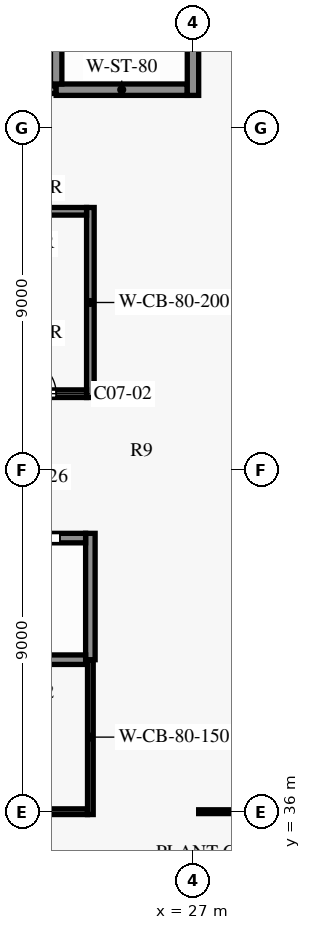
"""IFC4 building model, lengths in metres.
Left out: names, types, materials, properties, quantities, classifications, styles, units other than length and angle.
Written with IfcOpenShell. Run it as: python <this file> out.ifc"""

import sys

from ifc_helpers import new_model, si_unit, direction, frame, frame_2d, origin, place, context, subcontext, project, spatial, rectangle, extrude, element, fill, save


model = new_model("IFC4")
c1 = context("Model", 3, precision=1e-05, world=origin(), true_north=direction((0.0, 1.0)))
c2 = subcontext(c1, "Body", "Model", "MODEL_VIEW")
j1 = project(units=[si_unit("LENGTHUNIT", "METRE"), si_unit("PLANEANGLEUNIT", "RADIAN")], contexts=[c1])
p1 = place(None, origin())
s1 = spatial("IfcSite", under=j1, at=p1, CompositionType="ELEMENT")
p2 = place(p1, origin())
s2 = spatial("IfcBuilding", under=s1, at=p2, CompositionType="ELEMENT")
p3 = place(p2, frame((0.0, 0.0, 32.0)))
s3 = spatial("IfcBuildingStorey", under=s2, at=p3, CompositionType="ELEMENT", Elevation=32.0)
p4 = place(p3, frame((12.4, 36.0, 0.0), z_axis=(0.0, 0.0, 1.0), x_axis=(1.0, 0.0, 0.0)))
e1 = element("IfcWall", 1, at=p4, inside=s3, PredefinedType="SHEAR", context=c2, shape_type="SweptSolid", body=[
    extrude(rectangle(XDim=11.825, YDim=0.15, at=frame_2d((5.913, 0.0))), origin(), (0.0, 0.0, 1.0), 5.2),
])
p5 = place(p4, frame((0.95, 0.0, 0.0)))
e2 = element("IfcOpeningElement", 2, at=p5, cuts=e1, PredefinedType="OPENING", context=c2, shape_type="SweptSolid", body=[
    extrude(rectangle(XDim=0.9, YDim=2.1, at=frame_2d((0.45, 1.05))), frame((0.0, 0.085, 0.0), z_axis=(0.0, -1.0, 0.0), x_axis=(1.0, 0.0, 0.0)), (0.0, 0.0, 1.0), 0.17),
])
p6 = place(p4, frame((3.75, 0.0, 0.0)))
e3 = element("IfcOpeningElement", 3, at=p6, cuts=e1, PredefinedType="OPENING", context=c2, shape_type="SweptSolid", body=[
    extrude(rectangle(XDim=0.9, YDim=2.1, at=frame_2d((0.45, 1.05))), frame((0.0, 0.085, 0.0), z_axis=(0.0, -1.0, 0.0), x_axis=(1.0, 0.0, 0.0)), (0.0, 0.0, 1.0), 0.17),
])
p7 = place(p4, frame((6.325, 0.0, 0.0)))
e4 = element("IfcOpeningElement", 4, at=p7, cuts=e1, PredefinedType="OPENING", context=c2, shape_type="SweptSolid", body=[
    extrude(rectangle(XDim=0.95, YDim=2.1, at=frame_2d((0.475, 1.05))), frame((0.0, 0.085, 0.0), z_axis=(0.0, -1.0, 0.0), x_axis=(1.0, 0.0, 0.0)), (0.0, 0.0, 1.0), 0.17),
])
p8 = place(p4, frame((9.5, 0.0, 0.0)))
e5 = element("IfcOpeningElement", 5, at=p8, cuts=e1, PredefinedType="OPENING", context=c2, shape_type="SweptSolid", body=[
    extrude(rectangle(XDim=0.9, YDim=2.1, at=frame_2d((0.45, 1.05))), frame((0.0, 0.085, 0.0), z_axis=(0.0, -1.0, 0.0), x_axis=(1.0, 0.0, 0.0)), (0.0, 0.0, 1.0), 0.17),
])
p9 = place(p3, frame((8.1, 40.0, 0.0), z_axis=(0.0, 0.0, 1.0), x_axis=(1.0, 0.0, 0.0)))
e6 = element("IfcWall", 6, at=p9, inside=s3, PredefinedType="SHEAR", context=c2, shape_type="SweptSolid", body=[
    extrude(rectangle(XDim=16.075, YDim=0.25, at=frame_2d((8.038, 0.0))), origin(), (0.0, 0.0, 1.0), 5.2),
])
p10 = place(p3, frame((8.1, 43.2, 0.0), z_axis=(0.0, 0.0, 1.0), x_axis=(1.0, 0.0, 0.0)))
e7 = element("IfcWall", 7, at=p10, inside=s3, PredefinedType="SHEAR", context=c2, shape_type="SweptSolid", body=[
    extrude(rectangle(XDim=16.075, YDim=0.25, at=frame_2d((8.038, 0.0))), origin(), (0.0, 0.0, 1.0), 5.2),
])
p11 = place(p10, frame((14.3, 0.0, 0.0)))
e8 = element("IfcOpeningElement", 8, at=p11, cuts=e7, PredefinedType="OPENING", context=c2, shape_type="SweptSolid", body=[
    extrude(rectangle(XDim=1.1, YDim=2.1, at=frame_2d((0.55, 1.05))), frame((0.0, 0.135, 0.0), z_axis=(0.0, -1.0, 0.0), x_axis=(1.0, 0.0, 0.0)), (0.0, 0.0, 1.0), 0.27),
])
p12 = place(p10, frame((0.8, 0.0, 0.0)))
e9 = element("IfcOpeningElement", 9, at=p12, cuts=e7, PredefinedType="OPENING", context=c2, shape_type="SweptSolid", body=[
    extrude(rectangle(XDim=1.1, YDim=2.1, at=frame_2d((0.55, 1.05))), frame((0.0, 0.135, 0.0), z_axis=(0.0, -1.0, 0.0), x_axis=(1.0, 0.0, 0.0)), (0.0, 0.0, 1.0), 0.27),
])
p13 = place(p10, frame((3.5, 0.0, 0.0)))
e10 = element("IfcOpeningElement", 10, at=p13, cuts=e7, PredefinedType="OPENING", context=c2, shape_type="SweptSolid", body=[
    extrude(rectangle(XDim=1.1, YDim=2.1, at=frame_2d((0.55, 1.05))), frame((0.0, 0.135, 0.0), z_axis=(0.0, -1.0, 0.0), x_axis=(1.0, 0.0, 0.0)), (0.0, 0.0, 1.0), 0.27),
])
p14 = place(p10, frame((6.2, 0.0, 0.0)))
e11 = element("IfcOpeningElement", 11, at=p14, cuts=e7, PredefinedType="OPENING", context=c2, shape_type="SweptSolid", body=[
    extrude(rectangle(XDim=1.1, YDim=2.1, at=frame_2d((0.55, 1.05))), frame((0.0, 0.135, 0.0), z_axis=(0.0, -1.0, 0.0), x_axis=(1.0, 0.0, 0.0)), (0.0, 0.0, 1.0), 0.27),
])
p15 = place(p10, frame((8.9, 0.0, 0.0)))
e12 = element("IfcOpeningElement", 12, at=p15, cuts=e7, PredefinedType="OPENING", context=c2, shape_type="SweptSolid", body=[
    extrude(rectangle(XDim=1.1, YDim=2.1, at=frame_2d((0.55, 1.05))), frame((0.0, 0.135, 0.0), z_axis=(0.0, -1.0, 0.0), x_axis=(1.0, 0.0, 0.0)), (0.0, 0.0, 1.0), 0.27),
])
p16 = place(p10, frame((11.6, 0.0, 0.0)))
e13 = element("IfcOpeningElement", 13, at=p16, cuts=e7, PredefinedType="OPENING", context=c2, shape_type="SweptSolid", body=[
    extrude(rectangle(XDim=1.1, YDim=2.1, at=frame_2d((0.55, 1.05))), frame((0.0, 0.135, 0.0), z_axis=(0.0, -1.0, 0.0), x_axis=(1.0, 0.0, 0.0)), (0.0, 0.0, 1.0), 0.27),
])
p17 = place(p3, frame((21.6, 47.0, 0.0), z_axis=(0.0, 0.0, 1.0), x_axis=(1.0, 0.0, 0.0)))
e14 = element("IfcWall", 14, at=p17, inside=s3, PredefinedType="PARTITIONING", context=c2, shape_type="SweptSolid", body=[
    extrude(rectangle(XDim=2.6, YDim=0.2, at=frame_2d((1.3, 0.0))), origin(), (0.0, 0.0, 1.0), 5.2),
])
p18 = place(p17, frame((0.9, 0.0, 0.0)))
e15 = element("IfcOpeningElement", 15, at=p18, cuts=e14, PredefinedType="OPENING", context=c2, shape_type="SweptSolid", body=[
    extrude(rectangle(XDim=0.9, YDim=2.1, at=frame_2d((0.45, 1.05))), frame((0.0, 0.11, 0.0), z_axis=(0.0, -1.0, 0.0), x_axis=(1.0, 0.0, 0.0)), (0.0, 0.0, 1.0), 0.22),
])
p19 = place(p3, frame((21.6, 51.8, 0.0), z_axis=(0.0, 0.0, 1.0), x_axis=(1.0, 0.0, 0.0)))
e16 = element("IfcWall", 16, at=p19, inside=s3, PredefinedType="PARTITIONING", context=c2, shape_type="SweptSolid", body=[
    extrude(rectangle(XDim=2.6, YDim=0.2, at=frame_2d((1.3, 0.0))), origin(), (0.0, 0.0, 1.0), 5.2),
])
p20 = place(p3, frame((16.15, 55.0, 0.0), z_axis=(0.0, 0.0, 1.0), x_axis=(1.0, 0.0, 0.0)))
e17 = element("IfcWall", 17, at=p20, inside=s3, PredefinedType="PARTITIONING", context=c2, shape_type="SweptSolid", body=[
    extrude(rectangle(XDim=7.25, YDim=0.2, at=frame_2d((3.625, 0.0))), origin(), (0.0, 0.0, 1.0), 5.2),
])
p21 = place(p20, frame((3.125, 0.0, 0.0)))
e18 = element("IfcOpeningElement", 18, at=p21, cuts=e17, PredefinedType="OPENING", context=c2, shape_type="SweptSolid", body=[
    extrude(rectangle(XDim=1.0, YDim=2.1, at=frame_2d((0.5, 1.05))), frame((0.0, 0.11, 0.0), z_axis=(0.0, -1.0, 0.0), x_axis=(1.0, 0.0, 0.0)), (0.0, 0.0, 1.0), 0.22),
])
p22 = place(p3, frame((23.4, 55.0, 0.0), z_axis=(0.0, 0.0, 1.0), x_axis=(1.0, 0.0, 0.0)))
e19 = element("IfcWall", 19, at=p22, inside=s3, PredefinedType="SHEAR", context=c2, shape_type="SweptSolid", body=[
    extrude(rectangle(XDim=3.45, YDim=0.3, at=frame_2d((1.725, 0.0))), origin(), (0.0, 0.0, 1.0), 5.2),
])
p23 = place(p3, frame((23.4, 55.15, 0.0), z_axis=(0.0, 0.0, 1.0), x_axis=(0.0, 1.0, 0.0)))
e20 = element("IfcWall", 20, at=p23, inside=s3, PredefinedType="SHEAR", context=c2, shape_type="SweptSolid", body=[
    extrude(rectangle(XDim=8.0, YDim=0.3, at=frame_2d((4.0, 0.0))), origin(), (0.0, 0.0, 1.0), 5.2),
])
p24 = place(p3, frame((24.3, 35.925, 0.0), z_axis=(0.0, 0.0, 1.0), x_axis=(0.0, 1.0, 0.0)))
e21 = element("IfcWall", 21, at=p24, inside=s3, PredefinedType="SHEAR", context=c2, shape_type="SweptSolid", body=[
    extrude(rectangle(XDim=4.075, YDim=0.15, at=frame_2d((2.038, 0.0))), origin(), (0.0, 0.0, 1.0), 5.2),
])
p25 = place(p3, frame((24.3, 46.9, 0.0), z_axis=(0.0, 0.0, 1.0), x_axis=(0.0, 1.0, 0.0)))
e22 = element("IfcWall", 22, at=p25, inside=s3, PredefinedType="SHEAR", context=c2, shape_type="SweptSolid", body=[
    extrude(rectangle(XDim=5.0, YDim=0.2, at=frame_2d((2.5, 0.0))), origin(), (0.0, 0.0, 1.0), 5.2),
])
p26 = place(p3, frame((24.3, 40.0, 0.0), z_axis=(0.0, 0.0, 1.0), x_axis=(0.0, 1.0, 0.0)))
e23 = element("IfcWall", 23, at=p26, inside=s3, PredefinedType="SHEAR", context=c2, shape_type="SweptSolid", body=[
    extrude(rectangle(XDim=3.325, YDim=0.25, at=frame_2d((1.663, 0.0))), origin(), (0.0, 0.0, 1.0), 5.2),
])
p27 = place(p3, frame((27.0, 54.85, 0.0), z_axis=(0.0, 0.0, 1.0), x_axis=(0.0, 1.0, 0.0)))
e24 = element("IfcWall", 24, at=p27, inside=s3, PredefinedType="SHEAR", context=c2, shape_type="SweptSolid", body=[
    extrude(rectangle(XDim=8.75, YDim=0.3, at=frame_2d((4.375, 0.0))), origin(), (0.0, 0.0, 1.0), 5.2),
])
p28 = place(p27, frame((6.55, 0.0, 0.0)))
e25 = element("IfcOpeningElement", 25, at=p28, cuts=e24, PredefinedType="OPENING", context=c2, shape_type="SweptSolid", body=[
    extrude(rectangle(XDim=1.2, YDim=2.2, at=frame_2d((0.6, 1.1))), frame((0.0, 0.16, 0.0), z_axis=(0.0, -1.0, 0.0), x_axis=(1.0, 0.0, 0.0)), (0.0, 0.0, 1.0), 0.32),
])
p29 = place(p3, frame((27.15, 36.0, 0.0), z_axis=(0.0, 0.0, 1.0), x_axis=(1.0, 0.0, 0.0)))
e26 = element("IfcWall", 26, at=p29, inside=s3, PredefinedType="PARTITIONING", context=c2, shape_type="SweptSolid", body=[
    extrude(rectangle(XDim=9.9, YDim=0.1, at=frame_2d((4.95, 0.0))), origin(), (0.0, 0.0, 1.0), 5.18),
])
p30 = place(p18, origin())
e27 = element("IfcDoor", 27, at=p30, inside=s3, OperationType="SINGLE_SWING_LEFT", PredefinedType="DOOR", context=c2, shape_type="SweptSolid", body=[
    extrude(rectangle(XDim=0.9, YDim=2.1, at=frame_2d((0.45, 1.05))), frame((0.0, 0.025, 0.0), z_axis=(0.0, -1.0, 0.0), x_axis=(1.0, 0.0, 0.0)), (0.0, 0.0, 1.0), 0.05),
])
fill(e15, e27)
p31 = place(p11, origin())
e28 = element("IfcDoor", 28, at=p31, inside=s3, OperationType="DOUBLE_DOOR_SLIDING", PredefinedType="DOOR", context=c2, shape_type="SweptSolid", body=[
    extrude(rectangle(XDim=1.1, YDim=2.1, at=frame_2d((0.55, 1.05))), frame((0.0, 0.025, 0.0), z_axis=(0.0, -1.0, 0.0), x_axis=(1.0, 0.0, 0.0)), (0.0, 0.0, 1.0), 0.05),
])
fill(e8, e28)
save(model, sys.argv[1])
